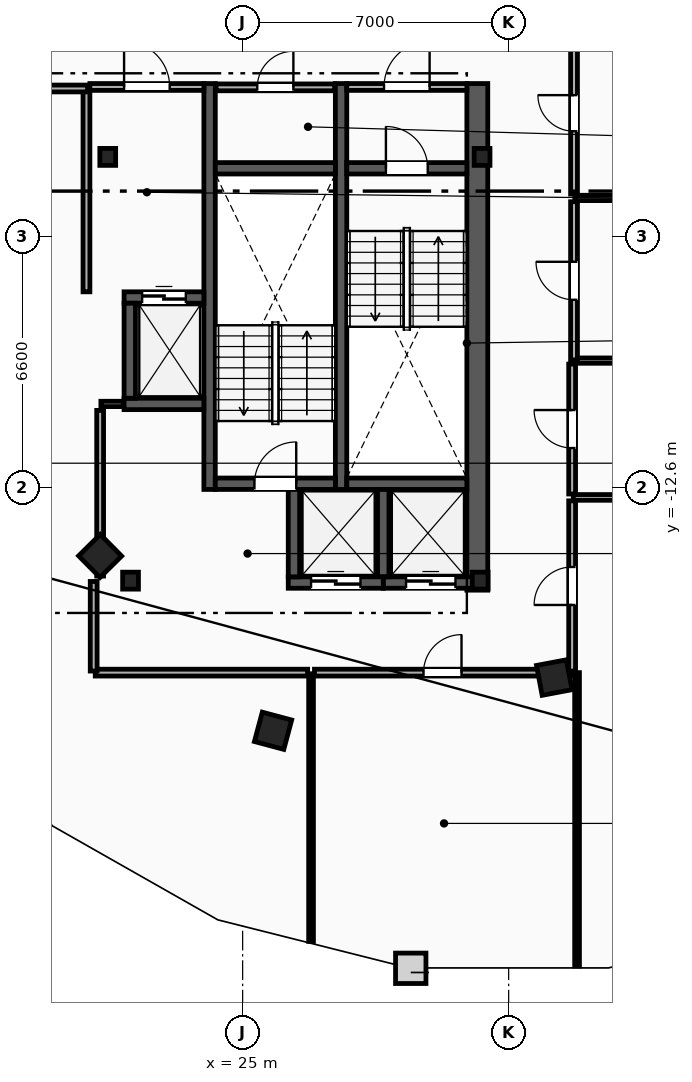
"""IFC4 building model, lengths in metres.
Left out: names, types, materials, properties, quantities, classifications, styles, units other than length and angle.
Written with IfcOpenShell. Run it as: python <this file> out.ifc"""

import sys

from ifc_helpers import new_model, si_unit, direction, frame, frame_2d, origin, origin_2d, place, context, subcontext, project, spatial, rectangle, i_section, extrude, element, fill, save


model = new_model("IFC4")
c1 = context("Model", 3, precision=1e-05, world=origin(), true_north=direction((0.0, 1.0)))
c2 = subcontext(c1, "Body", "Model", "MODEL_VIEW")
j1 = project(units=[si_unit("LENGTHUNIT", "METRE"), si_unit("PLANEANGLEUNIT", "RADIAN")], contexts=[c1])
p1 = place(None, origin())
s1 = spatial("IfcSite", under=j1, at=p1, CompositionType="ELEMENT")
p2 = place(p1, origin())
s2 = spatial("IfcBuilding", under=s1, at=p2, CompositionType="ELEMENT")
p3 = place(p2, frame((0.0, 0.0, 239.6)))
s3 = spatial("IfcBuildingStorey", under=s2, at=p3, CompositionType="ELEMENT", Elevation=239.6)
for number, where, z_axis, x_axis in (
    (1, (31.3, -3.9, 0.0), (0.0, 0.0, 1.0), (1.0, 0.0, 0.0)),
    (2, (21.45, -3.9, 0.0), (0.0, 0.0, 1.0), (1.0, 0.0, 0.0)),
    (3, (22.05, -15.05, 0.0), (0.0, 0.0, 1.0), (1.0, 0.0, 0.0)),
    (4, (31.25, -15.05, 0.0), (0.0, 0.0, 1.0), (1.0, 0.0, 0.0)),
):
    element("IfcColumn", number, at=place(p3, frame(where, z_axis=z_axis, x_axis=x_axis)), inside=s3, PredefinedType="COLUMN", context=c2, shape_type="SweptSolid", body=[
        extrude(i_section(OverallWidth=0.416, OverallDepth=0.446, WebThickness=0.039, FlangeThickness=0.063, FilletRadius=0.018, at=origin_2d()), origin(), (0.0, 0.0, 1.0), 3.6),
    ])
for number, where, z_axis, x_axis in (
    (5, (21.25, -14.4, 0.0), (0.0, 0.0, 1.0), (0.703, -0.711, 0.0)),
    (6, (25.8, -19.0, 0.0), (0.0, 0.0, 1.0), (0.966, -0.259, 0.0)),
    (7, (33.2, -17.6, 0.0), (0.0, 0.0, 1.0), (0.983, 0.186, 0.0)),
):
    element("IfcColumn", number, at=place(p3, frame(where, z_axis=z_axis, x_axis=x_axis)), inside=s3, PredefinedType="COLUMN", context=c2, shape_type="SweptSolid", body=[
        extrude(rectangle(XDim=0.8, YDim=0.8, at=origin_2d()), origin(), (0.0, 0.0, 1.0), 3.6),
    ])
p4 = place(p3, frame((31.175, -15.3, 0.0), z_axis=(0.0, 0.0, 1.0), x_axis=(0.0, 1.0, 0.0)))
e8 = element("IfcWall", 8, at=p4, inside=s3, PredefinedType="SHEAR", context=c2, shape_type="SweptSolid", body=[
    extrude(rectangle(XDim=13.33, YDim=0.55, at=frame_2d((6.665, 0.0))), origin(), (0.0, 0.0, 1.0), 3.34),
])
for number, where, z_axis, x_axis in (
    (9, (27.59, -12.65, 0.0), (0.0, 0.0, 1.0), (0.0, 1.0, 0.0)),
    (10, (24.13, -12.65, 0.0), (0.0, 0.0, 1.0), (0.0, 1.0, 0.0)),
):
    element("IfcWall", number, at=place(p3, frame(where, z_axis=z_axis, x_axis=x_axis)), inside=s3, PredefinedType="SHEAR", context=c2, shape_type="SweptSolid", body=[
        extrude(rectangle(XDim=10.68, YDim=0.3, at=frame_2d((5.34, 0.0))), origin(), (0.0, 0.0, 1.0), 3.34),
    ])
p5 = place(p3, frame((27.74, -4.2, 0.0), z_axis=(0.0, 0.0, 1.0), x_axis=(1.0, 0.0, 0.0)))
e11 = element("IfcWall", 11, at=p5, inside=s3, PredefinedType="SHEAR", context=c2, shape_type="SweptSolid", body=[
    extrude(rectangle(XDim=3.16, YDim=0.3, at=frame_2d((1.58, 0.0))), origin(), (0.0, 0.0, 1.0), 3.34),
])
p6 = place(p5, frame((1.03, 0.0, 0.0)))
e12 = element("IfcOpeningElement", 12, at=p6, cuts=e11, PredefinedType="OPENING", context=c2, shape_type="SweptSolid", body=[
    extrude(rectangle(XDim=1.1, YDim=2.15, at=frame_2d((0.55, 1.075))), frame((0.0, 0.16, 0.0), z_axis=(0.0, -1.0, 0.0), x_axis=(1.0, 0.0, 0.0)), (0.0, 0.0, 1.0), 0.32),
])
p7 = place(p3, frame((27.74, -12.5, 0.0), z_axis=(0.0, 0.0, 1.0), x_axis=(1.0, 0.0, 0.0)))
e13 = element("IfcWall", 13, at=p7, inside=s3, PredefinedType="SHEAR", context=c2, shape_type="SweptSolid", body=[
    extrude(rectangle(XDim=3.16, YDim=0.3, at=frame_2d((1.58, 0.0))), origin(), (0.0, 0.0, 1.0), 3.34),
])
p8 = place(p3, frame((24.28, -12.5, 0.0), z_axis=(0.0, 0.0, 1.0), x_axis=(1.0, 0.0, 0.0)))
e14 = element("IfcWall", 14, at=p8, inside=s3, PredefinedType="SHEAR", context=c2, shape_type="SweptSolid", body=[
    extrude(rectangle(XDim=3.16, YDim=0.3, at=frame_2d((1.58, 0.0))), origin(), (0.0, 0.0, 1.0), 3.34),
])
p9 = place(p8, frame((1.03, 0.0, 0.0)))
e15 = element("IfcOpeningElement", 15, at=p9, cuts=e14, PredefinedType="OPENING", context=c2, shape_type="SweptSolid", body=[
    extrude(rectangle(XDim=1.1, YDim=2.15, at=frame_2d((0.55, 1.075))), frame((0.0, 0.16, 0.0), z_axis=(0.0, -1.0, 0.0), x_axis=(1.0, 0.0, 0.0)), (0.0, 0.0, 1.0), 0.32),
])
p10 = place(p3, frame((24.28, -4.2, 0.0), z_axis=(0.0, 0.0, 1.0), x_axis=(1.0, 0.0, 0.0)))
e16 = element("IfcWall", 16, at=p10, inside=s3, PredefinedType="SHEAR", context=c2, shape_type="SweptSolid", body=[
    extrude(rectangle(XDim=3.16, YDim=0.3, at=frame_2d((1.58, 0.0))), origin(), (0.0, 0.0, 1.0), 3.34),
])
p11 = place(p3, frame((20.89, -7.45, 0.0), z_axis=(0.0, 0.0, 1.0), x_axis=(0.0, 1.0, 0.0)))
e17 = element("IfcWall", 17, at=p11, inside=s3, PredefinedType="PARTITIONING", context=c2, shape_type="SweptSolid", body=[
    extrude(rectangle(XDim=5.3, YDim=0.18, at=frame_2d((2.65, 0.0))), origin(), (0.0, 0.0, 1.0), 3.34),
])
p12 = place(p3, frame((20.98, -2.06, 0.0), z_axis=(0.0, 0.0, 1.0), x_axis=(1.0, 0.0, 0.0)))
e18 = element("IfcWall", 18, at=p12, inside=s3, PredefinedType="PARTITIONING", context=c2, shape_type="SweptSolid", body=[
    extrude(rectangle(XDim=3.0, YDim=0.18, at=frame_2d((1.5, 0.0))), origin(), (0.0, 0.0, 1.0), 3.34),
])
p13 = place(p12, frame((0.9, 0.0, 0.0)))
e19 = element("IfcOpeningElement", 19, at=p13, cuts=e18, PredefinedType="OPENING", context=c2, shape_type="SweptSolid", body=[
    extrude(rectangle(XDim=1.2, YDim=2.15, at=frame_2d((0.6, 1.075))), frame((0.0, 0.1, 0.0), z_axis=(0.0, -1.0, 0.0), x_axis=(1.0, 0.0, 0.0)), (0.0, 0.0, 1.0), 0.2),
])
p14 = place(p3, frame((27.74, -2.06, 0.0), z_axis=(0.0, 0.0, 1.0), x_axis=(1.0, 0.0, 0.0)))
e20 = element("IfcWall", 20, at=p14, inside=s3, PredefinedType="PARTITIONING", context=c2, shape_type="SweptSolid", body=[
    extrude(rectangle(XDim=3.16, YDim=0.18, at=frame_2d((1.58, 0.0))), origin(), (0.0, 0.0, 1.0), 3.34),
])
p15 = place(p14, frame((0.98, 0.0, 0.0)))
e21 = element("IfcOpeningElement", 21, at=p15, cuts=e20, PredefinedType="OPENING", context=c2, shape_type="SweptSolid", body=[
    extrude(rectangle(XDim=1.2, YDim=2.15, at=frame_2d((0.6, 1.075))), frame((0.0, 0.1, 0.0), z_axis=(0.0, -1.0, 0.0), x_axis=(1.0, 0.0, 0.0)), (0.0, 0.0, 1.0), 0.2),
])
p16 = place(p3, frame((21.88, -7.6, 0.0), z_axis=(0.0, 0.0, 1.0), x_axis=(1.0, 0.0, 0.0)))
e22 = element("IfcWall", 22, at=p16, inside=s3, PredefinedType="SHEAR", context=c2, shape_type="SweptSolid", body=[
    extrude(rectangle(XDim=2.1, YDim=0.3, at=frame_2d((1.05, 0.0))), origin(), (0.0, 0.0, 1.0), 3.34),
])
p17 = place(p16, frame((0.475, 0.0, 0.0)))
e23 = element("IfcOpeningElement", 23, at=p17, cuts=e22, PredefinedType="OPENING", context=c2, shape_type="SweptSolid", body=[
    extrude(rectangle(XDim=1.15, YDim=2.2, at=frame_2d((0.575, 1.1))), frame((0.0, 0.16, 0.0), z_axis=(0.0, -1.0, 0.0), x_axis=(1.0, 0.0, 0.0)), (0.0, 0.0, 1.0), 0.32),
])
p18 = place(p3, frame((21.88, -10.4, 0.0), z_axis=(0.0, 0.0, 1.0), x_axis=(1.0, 0.0, 0.0)))
e24 = element("IfcWall", 24, at=p18, inside=s3, PredefinedType="SHEAR", context=c2, shape_type="SweptSolid", body=[
    extrude(rectangle(XDim=2.1, YDim=0.3, at=frame_2d((1.05, 0.0))), origin(), (0.0, 0.0, 1.0), 3.34),
])
p19 = place(p3, frame((22.03, -10.25, 0.0), z_axis=(0.0, 0.0, 1.0), x_axis=(0.0, 1.0, 0.0)))
e25 = element("IfcWall", 25, at=p19, inside=s3, PredefinedType="SHEAR", context=c2, shape_type="SweptSolid", body=[
    extrude(rectangle(XDim=2.5, YDim=0.3, at=frame_2d((1.25, 0.0))), origin(), (0.0, 0.0, 1.0), 3.34),
])
p20 = place(p3, frame((28.7, -15.1, 0.0), z_axis=(0.0, 0.0, 1.0), x_axis=(1.0, 0.0, 0.0)))
e26 = element("IfcWall", 26, at=p20, inside=s3, PredefinedType="SHEAR", context=c2, shape_type="SweptSolid", body=[
    extrude(rectangle(XDim=2.5, YDim=0.3, at=frame_2d((1.25, 0.0))), origin(), (0.0, 0.0, 1.0), 3.34),
])
p21 = place(p20, frame((0.6, 0.0, 0.0)))
e27 = element("IfcOpeningElement", 27, at=p21, cuts=e26, PredefinedType="OPENING", context=c2, shape_type="SweptSolid", body=[
    extrude(rectangle(XDim=1.3, YDim=2.2, at=frame_2d((0.65, 1.1))), frame((0.0, 0.16, 0.0), z_axis=(0.0, -1.0, 0.0), x_axis=(1.0, 0.0, 0.0)), (0.0, 0.0, 1.0), 0.32),
])
p22 = place(p3, frame((28.7, -14.95, 0.0), z_axis=(0.0, 0.0, 1.0), x_axis=(0.0, 1.0, 0.0)))
e28 = element("IfcWall", 28, at=p22, inside=s3, PredefinedType="SHEAR", context=c2, shape_type="SweptSolid", body=[
    extrude(rectangle(XDim=2.3, YDim=0.3, at=frame_2d((1.15, 0.0))), origin(), (0.0, 0.0, 1.0), 3.34),
])
p23 = place(p3, frame((26.2, -15.1, 0.0), z_axis=(0.0, 0.0, 1.0), x_axis=(1.0, 0.0, 0.0)))
e29 = element("IfcWall", 29, at=p23, inside=s3, PredefinedType="SHEAR", context=c2, shape_type="SweptSolid", body=[
    extrude(rectangle(XDim=2.5, YDim=0.3, at=frame_2d((1.25, 0.0))), origin(), (0.0, 0.0, 1.0), 3.34),
])
p24 = place(p23, frame((0.6, 0.0, 0.0)))
e30 = element("IfcOpeningElement", 30, at=p24, cuts=e29, PredefinedType="OPENING", context=c2, shape_type="SweptSolid", body=[
    extrude(rectangle(XDim=1.3, YDim=2.2, at=frame_2d((0.65, 1.1))), frame((0.0, 0.16, 0.0), z_axis=(0.0, -1.0, 0.0), x_axis=(1.0, 0.0, 0.0)), (0.0, 0.0, 1.0), 0.32),
])
p25 = place(p3, frame((26.35, -14.95, 0.0), z_axis=(0.0, 0.0, 1.0), x_axis=(0.0, 1.0, 0.0)))
e31 = element("IfcWall", 31, at=p25, inside=s3, PredefinedType="SHEAR", context=c2, shape_type="SweptSolid", body=[
    extrude(rectangle(XDim=2.3, YDim=0.3, at=frame_2d((1.15, 0.0))), origin(), (0.0, 0.0, 1.0), 3.34),
])
p26 = place(p3, frame((21.27, -10.4, 0.0), z_axis=(0.0, 0.0, 1.0), x_axis=(1.0, 0.0, 0.0)))
e32 = element("IfcWall", 32, at=p26, inside=s3, PredefinedType="PARTITIONING", context=c2, shape_type="SweptSolid", body=[
    extrude(rectangle(XDim=0.59, YDim=0.14, at=frame_2d((0.295, 0.0))), origin(), (0.0, 0.0, 1.0), 3.34),
])
p27 = place(p3, frame((21.25, -14.93, 0.0), z_axis=(0.0, 0.0, 1.0), x_axis=(0.0, 1.0, 0.0)))
e33 = element("IfcWall", 33, at=p27, inside=s3, PredefinedType="PARTITIONING", context=c2, shape_type="SweptSolid", body=[
    extrude(rectangle(XDim=4.36, YDim=0.18, at=frame_2d((2.18, 0.0))), origin(), (0.0, 0.0, 1.0), 3.34),
])
p28 = place(p3, frame((24.3, -2.07, 0.0), z_axis=(0.0, 0.0, 1.0), x_axis=(1.0, 0.0, 0.0)))
e34 = element("IfcWall", 34, at=p28, inside=s3, PredefinedType="PARTITIONING", context=c2, shape_type="SweptSolid", body=[
    extrude(rectangle(XDim=3.12, YDim=0.18, at=frame_2d((1.56, 0.0))), origin(), (0.0, 0.0, 1.0), 3.34),
])
p29 = place(p28, frame((1.085, 0.0, 0.0)))
e35 = element("IfcOpeningElement", 35, at=p29, cuts=e34, PredefinedType="OPENING", context=c2, shape_type="SweptSolid", body=[
    extrude(rectangle(XDim=0.95, YDim=2.1, at=frame_2d((0.475, 1.05))), frame((0.0, 0.1, 0.0), z_axis=(0.0, -1.0, 0.0), x_axis=(1.0, 0.0, 0.0)), (0.0, 0.0, 1.0), 0.2),
])
for number, where, z_axis, x_axis in (
    (36, (33.74, -4.98, 0.0), (0.0, 0.0, 1.0), (1.0, 0.0, 0.0)),
    (37, (33.74, -9.26, 0.0), (0.0, 0.0, 1.0), (1.0, 0.0, 0.0)),
):
    element("IfcWall", number, at=place(p3, frame(where, z_axis=z_axis, x_axis=x_axis)), inside=s3, PredefinedType="PARTITIONING", context=c2, shape_type="SweptSolid", body=[
        extrude(rectangle(XDim=4.48, YDim=0.14, at=frame_2d((2.24, 0.0))), origin(), (0.0, 0.0, 1.0), 3.34),
    ])
p30 = place(p3, frame((33.72, -4.88, 0.0), z_axis=(0.0, 0.0, 1.0), x_axis=(0.0, 1.0, 0.0)))
e38 = element("IfcWall", 38, at=p30, inside=s3, PredefinedType="PARTITIONING", context=c2, shape_type="SweptSolid", body=[
    extrude(rectangle(XDim=4.26, YDim=0.18, at=frame_2d((2.13, 0.0))), origin(), (0.0, 0.0, 1.0), 3.34),
])
p31 = place(p30, frame((1.655, 0.0, 0.0)))
e39 = element("IfcOpeningElement", 39, at=p31, cuts=e38, PredefinedType="OPENING", context=c2, shape_type="SweptSolid", body=[
    extrude(rectangle(XDim=0.95, YDim=2.1, at=frame_2d((0.475, 1.05))), frame((0.0, 0.1, 0.0), z_axis=(0.0, -1.0, 0.0), x_axis=(1.0, 0.0, 0.0)), (0.0, 0.0, 1.0), 0.2),
])
p32 = place(p3, frame((33.72, -9.24, 0.0), z_axis=(0.0, 0.0, 1.0), x_axis=(0.0, 1.0, 0.0)))
e40 = element("IfcWall", 40, at=p32, inside=s3, PredefinedType="PARTITIONING", context=c2, shape_type="SweptSolid", body=[
    extrude(rectangle(XDim=4.16, YDim=0.18, at=frame_2d((2.08, 0.0))), origin(), (0.0, 0.0, 1.0), 3.34),
])
p33 = place(p32, frame((1.58, 0.0, 0.0)))
e41 = element("IfcOpeningElement", 41, at=p33, cuts=e40, PredefinedType="OPENING", context=c2, shape_type="SweptSolid", body=[
    extrude(rectangle(XDim=1.0, YDim=2.15, at=frame_2d((0.5, 1.075))), frame((0.0, 0.1, 0.0), z_axis=(0.0, -1.0, 0.0), x_axis=(1.0, 0.0, 0.0)), (0.0, 0.0, 1.0), 0.2),
])
p34 = place(p3, frame((33.7, -12.86, 0.0), z_axis=(0.0, 0.0, 1.0), x_axis=(1.0, 0.0, 0.0)))
e42 = element("IfcWall", 42, at=p34, inside=s3, PredefinedType="PARTITIONING", context=c2, shape_type="SweptSolid", body=[
    extrude(rectangle(XDim=15.908, YDim=0.15, at=frame_2d((7.954, 0.0))), origin(), (0.0, 0.0, 1.0), 3.34),
])
p35 = place(p3, frame((26.8, -24.542, 0.0), z_axis=(0.0, 0.0, 1.0), x_axis=(0.0, 1.0, 0.0)))
e43 = element("IfcWall", 43, at=p35, inside=s3, PredefinedType="PARTITIONING", context=c2, shape_type="SweptSolid", body=[
    extrude(rectangle(XDim=7.042, YDim=0.125, at=frame_2d((3.521, 0.0))), origin(), (0.0, 0.0, 1.0), 3.34),
])
p36 = place(p3, frame((33.8, -25.19, 0.0), z_axis=(0.0, 0.0, 1.0), x_axis=(0.0, 1.0, 0.0)))
e44 = element("IfcWall", 44, at=p36, inside=s3, PredefinedType="PARTITIONING", context=c2, shape_type="SweptSolid", body=[
    extrude(rectangle(XDim=7.72, YDim=0.125, at=frame_2d((3.86, 0.0))), origin(), (0.0, 0.0, 1.0), 3.34),
])
p37 = place(p3, frame((26.89, -17.47, 0.0), z_axis=(0.0, 0.0, 1.0), x_axis=(1.0, 0.0, 0.0)))
e45 = element("IfcWall", 45, at=p37, inside=s3, PredefinedType="PARTITIONING", context=c2, shape_type="SweptSolid", body=[
    extrude(rectangle(XDim=6.739, YDim=0.18, at=frame_2d((3.369, 0.0))), origin(), (0.0, 0.0, 1.0), 3.34),
])
p38 = place(p37, frame((2.869, 0.0, 0.0)))
e46 = element("IfcOpeningElement", 46, at=p38, cuts=e45, PredefinedType="OPENING", context=c2, shape_type="SweptSolid", body=[
    extrude(rectangle(XDim=1.0, YDim=2.15, at=frame_2d((0.5, 1.075))), frame((0.0, 0.1, 0.0), z_axis=(0.0, -1.0, 0.0), x_axis=(1.0, 0.0, 0.0)), (0.0, 0.0, 1.0), 0.2),
])
p39 = place(p3, frame((33.67, -17.43, 0.0), z_axis=(0.0, 0.0, 1.0), x_axis=(0.0, 1.0, 0.0)))
e47 = element("IfcWall", 47, at=p39, inside=s3, PredefinedType="PARTITIONING", context=c2, shape_type="SweptSolid", body=[
    extrude(rectangle(XDim=4.48, YDim=0.18, at=frame_2d((2.24, 0.0))), origin(), (0.0, 0.0, 1.0), 3.34),
])
p40 = place(p39, frame((1.74, 0.0, 0.0)))
e48 = element("IfcOpeningElement", 48, at=p40, cuts=e47, PredefinedType="OPENING", context=c2, shape_type="SweptSolid", body=[
    extrude(rectangle(XDim=1.0, YDim=2.15, at=frame_2d((0.5, 1.075))), frame((0.0, 0.1, 0.0), z_axis=(0.0, -1.0, 0.0), x_axis=(1.0, 0.0, 0.0)), (0.0, 0.0, 1.0), 0.2),
])
p41 = place(p3, frame((13.521, -2.1, 0.0), z_axis=(0.0, 0.0, 1.0), x_axis=(1.0, 0.0, 0.0)))
e49 = element("IfcWall", 49, at=p41, inside=s3, PredefinedType="PARTITIONING", context=c2, shape_type="SweptSolid", body=[
    extrude(rectangle(XDim=7.398, YDim=0.18, at=frame_2d((3.699, 0.0))), origin(), (0.0, 0.0, 1.0), 3.34),
])
p42 = place(p41, frame((3.199, 0.0, 0.0)))
e50 = element("IfcOpeningElement", 50, at=p42, cuts=e49, PredefinedType="OPENING", context=c2, shape_type="SweptSolid", body=[
    extrude(rectangle(XDim=1.0, YDim=2.15, at=frame_2d((0.5, 1.075))), frame((0.0, 0.1, 0.0), z_axis=(0.0, -1.0, 0.0), x_axis=(1.0, 0.0, 0.0)), (0.0, 0.0, 1.0), 0.2),
])
p43 = place(p3, frame((21.122, -17.47, 0.0), z_axis=(0.0, 0.0, 1.0), x_axis=(1.0, 0.0, 0.0)))
e51 = element("IfcWall", 51, at=p43, inside=s3, PredefinedType="PARTITIONING", context=c2, shape_type="SweptSolid", body=[
    extrude(rectangle(XDim=5.588, YDim=0.18, at=frame_2d((2.794, 0.0))), origin(), (0.0, 0.0, 1.0), 3.34),
])
p44 = place(p3, frame((21.08, -15.072, 0.0), z_axis=(0.0, 0.0, 1.0), x_axis=(0.0, -1.0, 0.0)))
e52 = element("IfcWall", 52, at=p44, inside=s3, PredefinedType="PARTITIONING", context=c2, shape_type="SweptSolid", body=[
    extrude(rectangle(XDim=2.357, YDim=0.18, at=frame_2d((1.178, 0.0))), origin(), (0.0, 0.0, 1.0), 3.34),
])
p45 = place(p3, frame((33.67, -12.77, 0.0), z_axis=(0.0, 0.0, 1.0), x_axis=(0.0, 1.0, 0.0)))
e53 = element("IfcWall", 53, at=p45, inside=s3, PredefinedType="PARTITIONING", context=c2, shape_type="SweptSolid", body=[
    extrude(rectangle(XDim=3.419, YDim=0.18, at=frame_2d((1.709, 0.0))), origin(), (0.0, 0.0, 1.0), 3.34),
])
p46 = place(p45, frame((1.209, 0.0, 0.0)))
e54 = element("IfcOpeningElement", 54, at=p46, cuts=e53, PredefinedType="OPENING", context=c2, shape_type="SweptSolid", body=[
    extrude(rectangle(XDim=1.0, YDim=2.15, at=frame_2d((0.5, 1.075))), frame((0.0, 0.1, 0.0), z_axis=(0.0, -1.0, 0.0), x_axis=(1.0, 0.0, 0.0)), (0.0, 0.0, 1.0), 0.2),
])
p47 = place(p6, origin())
e55 = element("IfcDoor", 55, at=p47, inside=s3, OperationType="SINGLE_SWING_LEFT", PredefinedType="DOOR", context=c2, shape_type="SweptSolid", body=[
    extrude(rectangle(XDim=1.1, YDim=2.15, at=frame_2d((0.55, 1.075))), frame((0.0, 0.025, 0.0), z_axis=(0.0, -1.0, 0.0), x_axis=(1.0, 0.0, 0.0)), (0.0, 0.0, 1.0), 0.05),
])
fill(e12, e55)
p48 = place(p9, origin())
e56 = element("IfcDoor", 56, at=p48, inside=s3, OperationType="SINGLE_SWING_RIGHT", PredefinedType="DOOR", context=c2, shape_type="SweptSolid", body=[
    extrude(rectangle(XDim=1.1, YDim=2.15, at=frame_2d((0.55, 1.075))), frame((0.0, 0.025, 0.0), z_axis=(0.0, -1.0, 0.0), x_axis=(1.0, 0.0, 0.0)), (0.0, 0.0, 1.0), 0.05),
])
fill(e15, e56)
p49 = place(p13, origin())
e57 = element("IfcDoor", 57, at=p49, inside=s3, OperationType="SINGLE_SWING_LEFT", PredefinedType="DOOR", context=c2, shape_type="SweptSolid", body=[
    extrude(rectangle(XDim=1.2, YDim=2.15, at=frame_2d((0.6, 1.075))), frame((0.0, 0.025, 0.0), z_axis=(0.0, -1.0, 0.0), x_axis=(1.0, 0.0, 0.0)), (0.0, 0.0, 1.0), 0.05),
])
fill(e19, e57)
p50 = place(p15, origin())
e58 = element("IfcDoor", 58, at=p50, inside=s3, OperationType="SINGLE_SWING_RIGHT", PredefinedType="DOOR", context=c2, shape_type="SweptSolid", body=[
    extrude(rectangle(XDim=1.2, YDim=2.15, at=frame_2d((0.6, 1.075))), frame((0.0, 0.025, 0.0), z_axis=(0.0, -1.0, 0.0), x_axis=(1.0, 0.0, 0.0)), (0.0, 0.0, 1.0), 0.05),
])
fill(e21, e58)
p51 = place(p17, origin())
e59 = element("IfcDoor", 59, at=p51, inside=s3, OperationType="SLIDING_TO_LEFT", PredefinedType="TRAPDOOR", context=c2, shape_type="SweptSolid", body=[
    extrude(rectangle(XDim=1.15, YDim=2.2, at=frame_2d((0.575, 1.1))), frame((0.0, 0.025, 0.0), z_axis=(0.0, -1.0, 0.0), x_axis=(1.0, 0.0, 0.0)), (0.0, 0.0, 1.0), 0.05),
])
fill(e23, e59)
p52 = place(p21, origin())
e60 = element("IfcDoor", 60, at=p52, inside=s3, OperationType="SLIDING_TO_LEFT", PredefinedType="TRAPDOOR", context=c2, shape_type="SweptSolid", body=[
    extrude(rectangle(XDim=1.3, YDim=2.2, at=frame_2d((0.65, 1.1))), frame((0.0, 0.025, 0.0), z_axis=(0.0, -1.0, 0.0), x_axis=(1.0, 0.0, 0.0)), (0.0, 0.0, 1.0), 0.05),
])
fill(e27, e60)
p53 = place(p24, origin())
e61 = element("IfcDoor", 61, at=p53, inside=s3, OperationType="SLIDING_TO_LEFT", PredefinedType="TRAPDOOR", context=c2, shape_type="SweptSolid", body=[
    extrude(rectangle(XDim=1.3, YDim=2.2, at=frame_2d((0.65, 1.1))), frame((0.0, 0.025, 0.0), z_axis=(0.0, -1.0, 0.0), x_axis=(1.0, 0.0, 0.0)), (0.0, 0.0, 1.0), 0.05),
])
fill(e30, e61)
p54 = place(p38, origin())
e62 = element("IfcDoor", 62, at=p54, inside=s3, OperationType="SINGLE_SWING_RIGHT", PredefinedType="DOOR", context=c2, shape_type="SweptSolid", body=[
    extrude(rectangle(XDim=1.0, YDim=2.15, at=frame_2d((0.5, 1.075))), frame((0.0, 0.025, 0.0), z_axis=(0.0, -1.0, 0.0), x_axis=(1.0, 0.0, 0.0)), (0.0, 0.0, 1.0), 0.05),
])
fill(e46, e62)
p55 = place(p40, origin())
e63 = element("IfcDoor", 63, at=p55, inside=s3, OperationType="SINGLE_SWING_LEFT", PredefinedType="DOOR", context=c2, shape_type="SweptSolid", body=[
    extrude(rectangle(XDim=1.0, YDim=2.15, at=frame_2d((0.5, 1.075))), frame((0.0, 0.025, 0.0), z_axis=(0.0, -1.0, 0.0), x_axis=(1.0, 0.0, 0.0)), (0.0, 0.0, 1.0), 0.05),
])
fill(e48, e63)
p56 = place(p31, origin())
e64 = element("IfcDoor", 64, at=p56, inside=s3, OperationType="SINGLE_SWING_RIGHT", PredefinedType="DOOR", context=c2, shape_type="SweptSolid", body=[
    extrude(rectangle(XDim=0.95, YDim=2.1, at=frame_2d((0.475, 1.05))), frame((0.0, 0.025, 0.0), z_axis=(0.0, -1.0, 0.0), x_axis=(1.0, 0.0, 0.0)), (0.0, 0.0, 1.0), 0.05),
])
fill(e39, e64)
p57 = place(p33, origin())
e65 = element("IfcDoor", 65, at=p57, inside=s3, OperationType="SINGLE_SWING_RIGHT", PredefinedType="DOOR", context=c2, shape_type="SweptSolid", body=[
    extrude(rectangle(XDim=1.0, YDim=2.15, at=frame_2d((0.5, 1.075))), frame((0.0, 0.025, 0.0), z_axis=(0.0, -1.0, 0.0), x_axis=(1.0, 0.0, 0.0)), (0.0, 0.0, 1.0), 0.05),
])
fill(e41, e65)
p58 = place(p46, origin())
e66 = element("IfcDoor", 66, at=p58, inside=s3, OperationType="SINGLE_SWING_RIGHT", PredefinedType="DOOR", context=c2, shape_type="SweptSolid", body=[
    extrude(rectangle(XDim=1.0, YDim=2.15, at=frame_2d((0.5, 1.075))), frame((0.0, 0.025, 0.0), z_axis=(0.0, -1.0, 0.0), x_axis=(1.0, 0.0, 0.0)), (0.0, 0.0, 1.0), 0.05),
])
fill(e54, e66)
p59 = place(p29, origin())
e67 = element("IfcDoor", 67, at=p59, inside=s3, OperationType="SINGLE_SWING_RIGHT", PredefinedType="DOOR", context=c2, shape_type="SweptSolid", body=[
    extrude(rectangle(XDim=0.95, YDim=2.1, at=frame_2d((0.475, 1.05))), frame((0.0, 0.025, 0.0), z_axis=(0.0, -1.0, 0.0), x_axis=(1.0, 0.0, 0.0)), (0.0, 0.0, 1.0), 0.05),
])
fill(e35, e67)
save(model, sys.argv[1])
